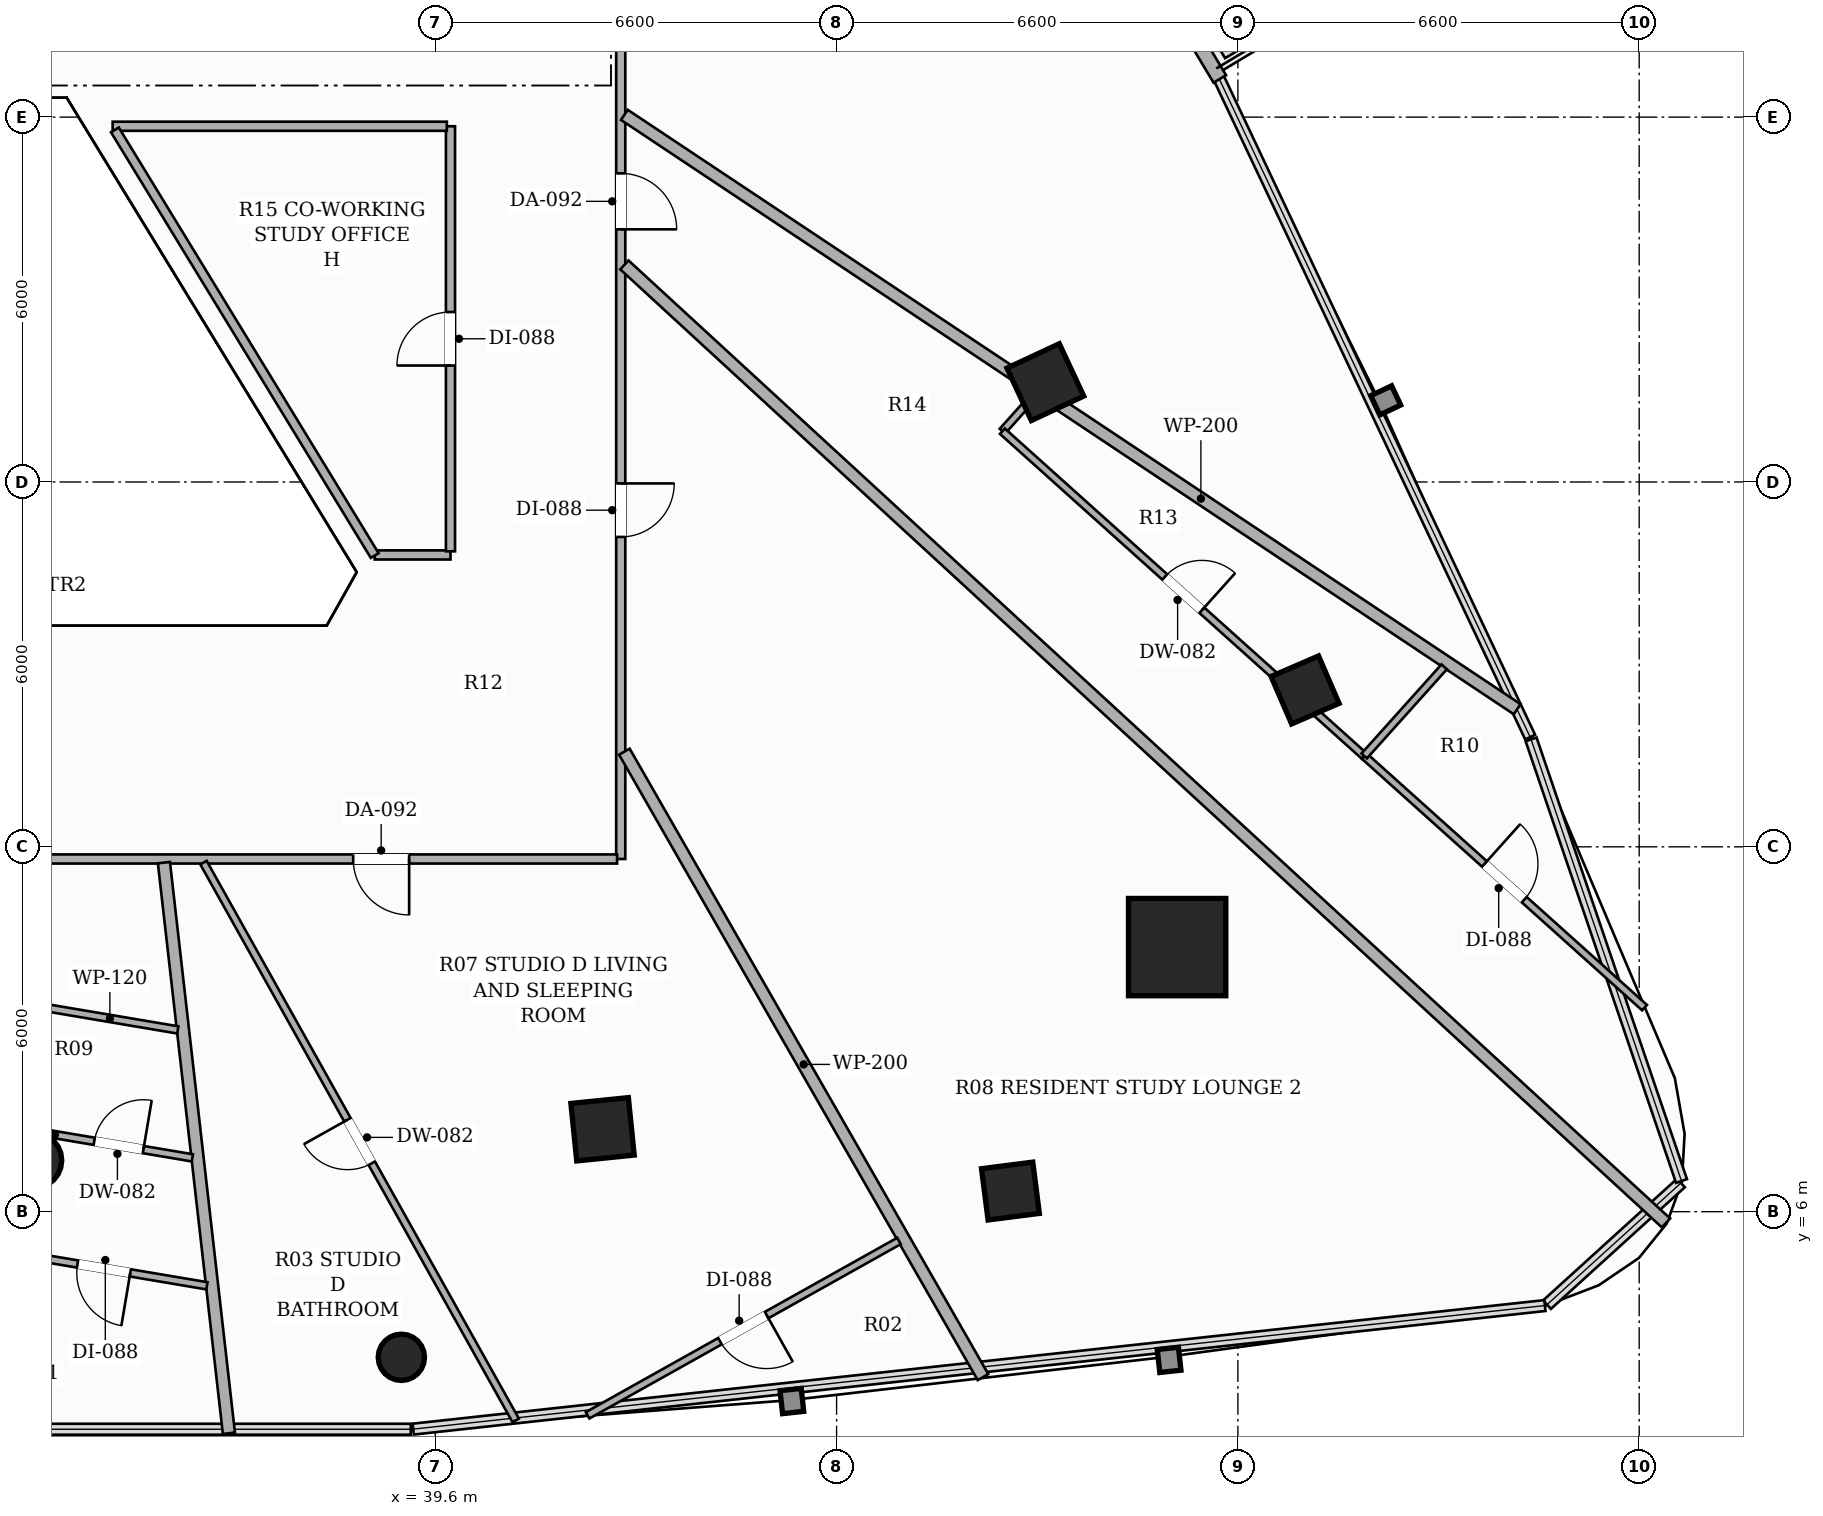
"""IFC4 building model, lengths in metres.
Left out: names, types, materials, properties, quantities, classifications, styles, units other than length and angle.
Written with IfcOpenShell. Run it as: python <this file> out.ifc"""

import sys

from ifc_helpers import new_model, si_unit, direction, frame, frame_2d, origin, origin_2d, place, context, subcontext, project, spatial, rectangle, hollow_rectangle, hollow_circle, extrude, element, fill, save


model = new_model("IFC4")
c1 = context("Model", 3, precision=1e-05, world=origin(), true_north=direction((0.0, 1.0)))
c2 = subcontext(c1, "Body", "Model", "MODEL_VIEW")
j1 = project(units=[si_unit("LENGTHUNIT", "METRE"), si_unit("PLANEANGLEUNIT", "RADIAN")], contexts=[c1])
p1 = place(None, origin())
s1 = spatial("IfcSite", under=j1, at=p1, CompositionType="ELEMENT")
p2 = place(p1, origin())
s2 = spatial("IfcBuilding", under=s1, at=p2, CompositionType="ELEMENT")
p3 = place(p2, frame((0.0, 0.0, 93.95)))
s3 = spatial("IfcBuildingStorey", under=s2, at=p3, CompositionType="ELEMENT", Elevation=93.95)
p4 = place(p3, frame((51.801, 10.351, 0.0), z_axis=(0.0, 0.0, 1.0), x_axis=(1.0, 0.0, 0.0)))
e1 = element("IfcColumn", 1, at=p4, inside=s3, PredefinedType="COLUMN", context=c2, shape_type="SweptSolid", body=[
    extrude(hollow_rectangle(XDim=1.6, YDim=1.6, WallThickness=0.05, at=origin_2d()), origin(), (0.0, 0.0, 1.0), 3.3),
])
p5 = place(p3, frame((33.0, 6.844, 0.0), z_axis=(0.0, 0.0, 1.0), x_axis=(1.0, 0.0, 0.0)))
e2 = element("IfcColumn", 2, at=p5, inside=s3, PredefinedType="COLUMN", context=c2, shape_type="SweptSolid", body=[
    extrude(hollow_circle(Radius=0.457, WallThickness=0.025, at=origin_2d()), origin(), (0.0, 0.0, 1.0), 3.3),
])
for number, where, z_axis, x_axis in (
    (3, (42.351, 7.355, 0.0), (0.0, 0.0, 1.0), (0.995, 0.101, 0.0)),
    (4, (49.633, 19.642, 0.0), (0.0, 0.0, 1.0), (-0.423, 0.906, 0.0)),
):
    element("IfcColumn", number, at=place(p3, frame(where, z_axis=z_axis, x_axis=x_axis)), inside=s3, PredefinedType="COLUMN", context=c2, shape_type="SweptSolid", body=[
        extrude(hollow_rectangle(XDim=0.95, YDim=0.95, WallThickness=0.032, at=origin_2d()), origin(), (0.0, 0.0, 1.0), 3.3),
    ])
for number, where, z_axis, x_axis in (
    (5, (49.059, 6.339, 0.0), (0.0, 0.0, 1.0), (0.992, 0.127, 0.0)),
    (6, (53.905, 14.58, 0.0), (0.0, 0.0, 1.0), (-0.397, 0.918, 0.0)),
):
    element("IfcColumn", number, at=place(p3, frame(where, z_axis=z_axis, x_axis=x_axis)), inside=s3, PredefinedType="COLUMN", context=c2, shape_type="SweptSolid", body=[
        extrude(hollow_rectangle(XDim=0.85, YDim=0.85, WallThickness=0.028, at=origin_2d()), origin(), (0.0, 0.0, 1.0), 3.3),
    ])
p6 = place(p3, frame((39.042, 3.605, 0.0), z_axis=(0.0, 0.0, 1.0), x_axis=(1.0, 0.0, 0.0)))
e7 = element("IfcColumn", 7, at=p6, inside=s3, PredefinedType="COLUMN", context=c2, shape_type="SweptSolid", body=[
    extrude(hollow_circle(Radius=0.381, WallThickness=0.022, at=origin_2d()), origin(), (0.0, 0.0, 1.0), 3.3),
])
p7 = place(p3, frame((52.503, 24.628, 0.0), z_axis=(0.0, 0.0, 1.0), x_axis=(-0.514369419392, 0.857568714678, 0.0)))
e8 = element("IfcWall", 8, at=p7, inside=s3, PredefinedType="SOLIDWALL", context=c2, shape_type="SweptSolid", body=[
    extrude(rectangle(XDim=12.22, YDim=0.24, at=frame_2d((6.11, 0.0))), origin(), (0.0, 0.0, 1.0), 2.584),
])
p8 = place(p7, frame((9.723, 0.0, 0.0)))
e9 = element("IfcOpeningElement", 9, at=p8, cuts=e8, PredefinedType="OPENING", context=c2, shape_type="SweptSolid", body=[
    extrude(rectangle(XDim=1.8, YDim=2.2, at=frame_2d((0.9, 1.1))), frame((0.0, 0.13, 0.0), z_axis=(0.0, -1.0, 0.0), x_axis=(1.0, 0.0, 0.0)), (0.0, 0.0, 1.0), 0.26),
])
p9 = place(p3, frame((42.65, 36.84, 0.0), z_axis=(0.0, 0.0, 1.0), x_axis=(0.0, -1.0, 0.0)))
e10 = element("IfcWall", 10, at=p9, inside=s3, PredefinedType="PARTITIONING", context=c2, shape_type="SweptSolid", body=[
    extrude(rectangle(XDim=25.04, YDim=0.15, at=frame_2d((12.52, 0.0))), origin(), (0.0, 0.0, 1.0), 2.373),
])
p10 = place(p9, frame((6.114, 0.0, 0.0)))
e11 = element("IfcOpeningElement", 11, at=p10, cuts=e10, PredefinedType="OPENING", context=c2, shape_type="SweptSolid", body=[
    extrude(rectangle(XDim=0.88, YDim=2.1, at=frame_2d((0.44, 1.05))), frame((0.0, 0.085, 0.0), z_axis=(0.0, -1.0, 0.0), x_axis=(1.0, 0.0, 0.0)), (0.0, 0.0, 1.0), 0.17),
])
p11 = place(p9, frame((18.864, 0.0, 0.0)))
e12 = element("IfcOpeningElement", 12, at=p11, cuts=e10, PredefinedType="OPENING", context=c2, shape_type="SweptSolid", body=[
    extrude(rectangle(XDim=0.88, YDim=2.1, at=frame_2d((0.44, 1.05))), frame((0.0, 0.085, 0.0), z_axis=(0.0, -1.0, 0.0), x_axis=(1.0, 0.0, 0.0)), (0.0, 0.0, 1.0), 0.17),
])
p12 = place(p9, frame((13.765, 0.0, 0.0)))
e13 = element("IfcOpeningElement", 13, at=p12, cuts=e10, PredefinedType="OPENING", context=c2, shape_type="SweptSolid", body=[
    extrude(rectangle(XDim=0.92, YDim=2.15, at=frame_2d((0.46, 1.075))), frame((0.0, 0.085, 0.0), z_axis=(0.0, -1.0, 0.0), x_axis=(1.0, 0.0, 0.0)), (0.0, 0.0, 1.0), 0.17),
])
p13 = place(p3, frame((42.59, 11.8, 0.0), z_axis=(0.0, 0.0, 1.0), x_axis=(-1.0, 0.0, 0.0)))
e14 = element("IfcWall", 14, at=p13, inside=s3, PredefinedType="PARTITIONING", context=c2, shape_type="SweptSolid", body=[
    extrude(rectangle(XDim=19.24, YDim=0.15, at=frame_2d((9.62, 0.0))), origin(), (0.0, 0.0, 1.0), 2.629),
])
p14 = place(p13, frame((11.192, 0.0, 0.0)))
e15 = element("IfcOpeningElement", 15, at=p14, cuts=e14, PredefinedType="OPENING", context=c2, shape_type="SweptSolid", body=[
    extrude(rectangle(XDim=0.92, YDim=2.15, at=frame_2d((0.46, 1.075))), frame((0.0, 0.085, 0.0), z_axis=(0.0, -1.0, 0.0), x_axis=(1.0, 0.0, 0.0)), (0.0, 0.0, 1.0), 0.17),
])
p15 = place(p13, frame((3.42, 0.0, 0.0)))
e16 = element("IfcOpeningElement", 16, at=p15, cuts=e14, PredefinedType="OPENING", context=c2, shape_type="SweptSolid", body=[
    extrude(rectangle(XDim=0.92, YDim=2.15, at=frame_2d((0.46, 1.075))), frame((0.0, 0.085, 0.0), z_axis=(0.0, -1.0, 0.0), x_axis=(1.0, 0.0, 0.0)), (0.0, 0.0, 1.0), 0.17),
])
p16 = place(p3, frame((38.604, 16.8, 0.0), z_axis=(0.0, 0.0, 1.0), x_axis=(1.0, 0.0, 0.0)))
e17 = element("IfcWall", 17, at=p16, inside=s3, PredefinedType="PARTITIONING", context=c2, shape_type="SweptSolid", body=[
    extrude(rectangle(XDim=1.246, YDim=0.15, at=frame_2d((0.623, 0.0))), origin(), (0.0, 0.0, 1.0), 3.02),
])
p17 = place(p3, frame((39.85, 16.86, 0.0), z_axis=(0.0, 0.0, 1.0), x_axis=(0.0, 1.0, 0.0)))
e18 = element("IfcWall", 18, at=p17, inside=s3, PredefinedType="PARTITIONING", context=c2, shape_type="SweptSolid", body=[
    extrude(rectangle(XDim=6.99, YDim=0.15, at=frame_2d((3.495, 0.0))), origin(), (0.0, 0.0, 1.0), 2.629),
])
p18 = place(p17, frame((3.055, 0.0, 0.0)))
e19 = element("IfcOpeningElement", 19, at=p18, cuts=e18, PredefinedType="OPENING", context=c2, shape_type="SweptSolid", body=[
    extrude(rectangle(XDim=0.88, YDim=2.1, at=frame_2d((0.44, 1.05))), frame((0.0, 0.085, 0.0), z_axis=(0.0, -1.0, 0.0), x_axis=(1.0, 0.0, 0.0)), (0.0, 0.0, 1.0), 0.17),
])
p19 = place(p3, frame((39.79, 23.85, 0.0), z_axis=(0.0, 0.0, 1.0), x_axis=(-1.0, 0.0, 0.0)))
e20 = element("IfcWall", 20, at=p19, inside=s3, PredefinedType="PARTITIONING", context=c2, shape_type="SweptSolid", body=[
    extrude(rectangle(XDim=5.496, YDim=0.15, at=frame_2d((2.748, 0.0))), origin(), (0.0, 0.0, 1.0), 2.629),
])
p20 = place(p3, frame((34.331, 23.79, 0.0), z_axis=(0.0, 0.0, 1.0), x_axis=(0.52102126657, -0.853543695297, 0.0)))
e21 = element("IfcWall", 21, at=p20, inside=s3, PredefinedType="PARTITIONING", context=c2, shape_type="SweptSolid", body=[
    extrude(rectangle(XDim=8.201, YDim=0.15, at=frame_2d((4.101, 0.0))), origin(), (0.0, 0.0, 1.0), 2.629),
])
p21 = place(p3, frame((57.393, 14.263, 0.0), z_axis=(0.0, 0.0, 1.0), x_axis=(-0.83243126042, 0.554128321488, 0.0)))
e22 = element("IfcWall", 22, at=p21, inside=s3, PredefinedType="PARTITIONING", context=c2, shape_type="SweptSolid", body=[
    extrude(rectangle(XDim=17.639, YDim=0.2, at=frame_2d((8.819, 0.0))), origin(), (0.0, 0.0, 1.0), 2.373),
])
p22 = place(p3, frame((48.608, 3.279, 0.0), z_axis=(0.0, 0.0, 1.0), x_axis=(-0.497428948928, 0.867504720891, 0.0)))
e23 = element("IfcWall", 23, at=p22, inside=s3, PredefinedType="PARTITIONING", context=c2, shape_type="SweptSolid", body=[
    extrude(rectangle(XDim=11.857, YDim=0.2, at=frame_2d((5.928, 0.0))), origin(), (0.0, 0.0, 1.0), 2.373),
])
p23 = place(p3, frame((42.71, 21.57, 0.0), z_axis=(0.0, 0.0, 1.0), x_axis=(0.736048495707, -0.67692880864, 0.0)))
e24 = element("IfcWall", 24, at=p23, inside=s3, PredefinedType="PARTITIONING", context=c2, shape_type="SweptSolid", body=[
    extrude(rectangle(XDim=23.274, YDim=0.2, at=frame_2d((11.637, 0.0))), origin(), (0.0, 0.0, 1.0), 2.373),
])
p24 = place(p3, frame((35.137, 11.74, 0.0), z_axis=(0.0, 0.0, 1.0), x_axis=(0.113194461651, -0.993572852815, 0.0)))
e25 = element("IfcWall", 25, at=p24, inside=s3, PredefinedType="PARTITIONING", context=c2, shape_type="SweptSolid", body=[
    extrude(rectangle(XDim=9.445, YDim=0.2, at=frame_2d((4.722, 0.0))), origin(), (0.0, 0.0, 1.0), 2.373),
])
p25 = place(p3, frame((35.365, 8.989, 0.0), z_axis=(0.0, 0.0, 1.0), x_axis=(-0.986047933852, 0.166461623646, 0.0)))
e26 = element("IfcWall", 26, at=p25, inside=s3, PredefinedType="PARTITIONING", context=c2, shape_type="SweptSolid", body=[
    extrude(rectangle(XDim=2.264, YDim=0.12, at=frame_2d((1.132, 0.0))), origin(), (0.0, 0.0, 1.0), 2.629),
])
p26 = place(p3, frame((32.794, 7.359, 0.0), z_axis=(0.0, 0.0, 1.0), x_axis=(0.986086685245, -0.166231913849, 0.0)))
e27 = element("IfcWall", 27, at=p26, inside=s3, PredefinedType="PARTITIONING", context=c2, shape_type="SweptSolid", body=[
    extrude(rectangle(XDim=2.851, YDim=0.12, at=frame_2d((1.425, 0.0))), origin(), (0.0, 0.0, 1.0), 2.629),
])
p27 = place(p26, frame((1.214, 0.0, 0.0)))
e28 = element("IfcOpeningElement", 28, at=p27, cuts=e27, PredefinedType="OPENING", context=c2, shape_type="SweptSolid", body=[
    extrude(rectangle(XDim=0.82, YDim=2.1, at=frame_2d((0.41, 1.05))), frame((0.0, 0.07, 0.0), z_axis=(0.0, -1.0, 0.0), x_axis=(1.0, 0.0, 0.0)), (0.0, 0.0, 1.0), 0.14),
])
p28 = place(p3, frame((35.844, 4.781, 0.0), z_axis=(0.0, 0.0, 1.0), x_axis=(-0.986098591399, 0.166161271182, 0.0)))
e29 = element("IfcWall", 29, at=p28, inside=s3, PredefinedType="PARTITIONING", context=c2, shape_type="SweptSolid", body=[
    extrude(rectangle(XDim=3.437, YDim=0.12, at=frame_2d((1.718, 0.0))), origin(), (0.0, 0.0, 1.0), 3.02),
])
p29 = place(p28, frame((1.278, 0.0, 0.0)))
e30 = element("IfcOpeningElement", 30, at=p29, cuts=e29, PredefinedType="OPENING", context=c2, shape_type="SweptSolid", body=[
    extrude(rectangle(XDim=0.88, YDim=2.1, at=frame_2d((0.44, 1.05))), frame((0.0, 0.07, 0.0), z_axis=(0.0, -1.0, 0.0), x_axis=(1.0, 0.0, 0.0)), (0.0, 0.0, 1.0), 0.14),
])
p30 = place(p3, frame((40.923, 2.567, 0.0), z_axis=(0.0, 0.0, 1.0), x_axis=(-0.4884640488, 0.872584020613, 0.0)))
e31 = element("IfcWall", 31, at=p30, inside=s3, PredefinedType="PARTITIONING", context=c2, shape_type="SweptSolid", body=[
    extrude(rectangle(XDim=10.512, YDim=0.12, at=frame_2d((5.256, 0.0))), origin(), (0.0, 0.0, 1.0), 2.373),
])
p31 = place(p30, frame((4.846, 0.0, 0.0)))
e32 = element("IfcOpeningElement", 32, at=p31, cuts=e31, PredefinedType="OPENING", context=c2, shape_type="SweptSolid", body=[
    extrude(rectangle(XDim=0.82, YDim=2.1, at=frame_2d((0.41, 1.05))), frame((0.0, 0.07, 0.0), z_axis=(0.0, -1.0, 0.0), x_axis=(1.0, 0.0, 0.0)), (0.0, 0.0, 1.0), 0.14),
])
p32 = place(p3, frame((47.226, 5.518, 0.0), z_axis=(0.0, 0.0, 1.0), x_axis=(-0.872551409816, -0.488522299622, 0.0)))
e33 = element("IfcWall", 33, at=p32, inside=s3, PredefinedType="PARTITIONING", context=c2, shape_type="SweptSolid", body=[
    extrude(rectangle(XDim=5.869, YDim=0.12, at=frame_2d((2.935, 0.0))), origin(), (0.0, 0.0, 1.0), 3.02),
])
p33 = place(p32, frame((2.494, 0.0, 0.0)))
e34 = element("IfcOpeningElement", 34, at=p33, cuts=e33, PredefinedType="OPENING", context=c2, shape_type="SweptSolid", body=[
    extrude(rectangle(XDim=0.88, YDim=2.1, at=frame_2d((0.44, 1.05))), frame((0.0, 0.07, 0.0), z_axis=(0.0, -1.0, 0.0), x_axis=(1.0, 0.0, 0.0)), (0.0, 0.0, 1.0), 0.14),
])
p34 = place(p3, frame((49.467, 19.437, 0.0), z_axis=(0.0, 0.0, 1.0), x_axis=(-0.667729657393, -0.744403858559, 0.0)))
e35 = element("IfcWall", 35, at=p34, inside=s3, PredefinedType="PARTITIONING", context=c2, shape_type="SweptSolid", body=[
    extrude(rectangle(XDim=0.809, YDim=0.12, at=frame_2d((0.404, 0.0))), origin(), (0.0, 0.0, 1.0), 2.373),
])
p35 = place(p3, frame((48.927, 18.835, 0.0), z_axis=(0.0, 0.0, 1.0), x_axis=(0.744157434795, -0.668004275615, 0.0)))
e36 = element("IfcWall", 36, at=p35, inside=s3, PredefinedType="PARTITIONING", context=c2, shape_type="SweptSolid", body=[
    extrude(rectangle(XDim=7.996, YDim=0.12, at=frame_2d((3.998, 0.0))), origin(), (0.0, 0.0, 1.0), 2.373),
])
p36 = place(p35, frame((3.588, 0.0, 0.0)))
e37 = element("IfcOpeningElement", 37, at=p36, cuts=e36, PredefinedType="OPENING", context=c2, shape_type="SweptSolid", body=[
    extrude(rectangle(XDim=0.82, YDim=2.1, at=frame_2d((0.41, 1.05))), frame((0.0, 0.07, 0.0), z_axis=(0.0, -1.0, 0.0), x_axis=(1.0, 0.0, 0.0)), (0.0, 0.0, 1.0), 0.14),
])
p37 = place(p3, frame((54.877, 13.494, 0.0), z_axis=(0.0, 0.0, 1.0), x_axis=(0.744181011259, -0.667978010477, 0.0)))
e38 = element("IfcWall", 38, at=p37, inside=s3, PredefinedType="PARTITIONING", context=c2, shape_type="SweptSolid", body=[
    extrude(rectangle(XDim=6.196, YDim=0.12, at=frame_2d((3.098, 0.0))), origin(), (0.0, 0.0, 1.0), 2.579),
])
p38 = place(p37, frame((2.658, 0.0, 0.0)))
e39 = element("IfcOpeningElement", 39, at=p38, cuts=e38, PredefinedType="OPENING", context=c2, shape_type="SweptSolid", body=[
    extrude(rectangle(XDim=0.88, YDim=2.1, at=frame_2d((0.44, 1.05))), frame((0.0, 0.07, 0.0), z_axis=(0.0, -1.0, 0.0), x_axis=(1.0, 0.0, 0.0)), (0.0, 0.0, 1.0), 0.14),
])
p39 = place(p3, frame((56.193, 14.96, 0.0), z_axis=(0.0, 0.0, 1.0), x_axis=(-0.668039966909, -0.744125394414, 0.0)))
e40 = element("IfcWall", 40, at=p39, inside=s3, PredefinedType="PARTITIONING", context=c2, shape_type="SweptSolid", body=[
    extrude(rectangle(XDim=1.97, YDim=0.12, at=frame_2d((0.985, 0.0))), origin(), (0.0, 0.0, 1.0), 2.579),
])
p40 = place(p11, origin())
e41 = element("IfcDoor", 41, at=p40, inside=s3, OperationType="SINGLE_SWING_LEFT", PredefinedType="DOOR", context=c2, shape_type="SweptSolid", body=[
    extrude(rectangle(XDim=0.88, YDim=2.1, at=frame_2d((0.44, 1.05))), frame((0.0, 0.025, 0.0), z_axis=(0.0, -1.0, 0.0), x_axis=(1.0, 0.0, 0.0)), (0.0, 0.0, 1.0), 0.05),
])
fill(e12, e41)
p41 = place(p27, origin())
e42 = element("IfcDoor", 42, at=p41, inside=s3, OperationType="SINGLE_SWING_RIGHT", PredefinedType="DOOR", context=c2, shape_type="SweptSolid", body=[
    extrude(rectangle(XDim=0.82, YDim=2.1, at=frame_2d((0.41, 1.05))), frame((0.0, 0.025, 0.0), z_axis=(0.0, -1.0, 0.0), x_axis=(1.0, 0.0, 0.0)), (0.0, 0.0, 1.0), 0.05),
])
fill(e28, e42)
p42 = place(p29, origin())
e43 = element("IfcDoor", 43, at=p42, inside=s3, OperationType="SINGLE_SWING_LEFT", PredefinedType="DOOR", context=c2, shape_type="SweptSolid", body=[
    extrude(rectangle(XDim=0.88, YDim=2.1, at=frame_2d((0.44, 1.05))), frame((0.0, 0.025, 0.0), z_axis=(0.0, -1.0, 0.0), x_axis=(1.0, 0.0, 0.0)), (0.0, 0.0, 1.0), 0.05),
])
fill(e30, e43)
p43 = place(p15, origin())
e44 = element("IfcDoor", 44, at=p43, inside=s3, OperationType="SINGLE_SWING_LEFT", PredefinedType="DOOR", context=c2, shape_type="SweptSolid", body=[
    extrude(rectangle(XDim=0.92, YDim=2.15, at=frame_2d((0.46, 1.075))), frame((0.0, 0.025, 0.0), z_axis=(0.0, -1.0, 0.0), x_axis=(1.0, 0.0, 0.0)), (0.0, 0.0, 1.0), 0.05),
])
fill(e16, e44)
p44 = place(p31, origin())
e45 = element("IfcDoor", 45, at=p44, inside=s3, OperationType="SINGLE_SWING_RIGHT", PredefinedType="DOOR", context=c2, shape_type="SweptSolid", body=[
    extrude(rectangle(XDim=0.82, YDim=2.1, at=frame_2d((0.41, 1.05))), frame((0.0, 0.025, 0.0), z_axis=(0.0, -1.0, 0.0), x_axis=(1.0, 0.0, 0.0)), (0.0, 0.0, 1.0), 0.05),
])
fill(e32, e45)
p45 = place(p33, origin())
e46 = element("IfcDoor", 46, at=p45, inside=s3, OperationType="SINGLE_SWING_LEFT", PredefinedType="DOOR", context=c2, shape_type="SweptSolid", body=[
    extrude(rectangle(XDim=0.88, YDim=2.1, at=frame_2d((0.44, 1.05))), frame((0.0, 0.025, 0.0), z_axis=(0.0, -1.0, 0.0), x_axis=(1.0, 0.0, 0.0)), (0.0, 0.0, 1.0), 0.05),
])
fill(e34, e46)
p46 = place(p12, origin())
e47 = element("IfcDoor", 47, at=p46, inside=s3, OperationType="SINGLE_SWING_RIGHT", PredefinedType="DOOR", context=c2, shape_type="SweptSolid", body=[
    extrude(rectangle(XDim=0.92, YDim=2.15, at=frame_2d((0.46, 1.075))), frame((0.0, 0.025, 0.0), z_axis=(0.0, -1.0, 0.0), x_axis=(1.0, 0.0, 0.0)), (0.0, 0.0, 1.0), 0.05),
])
fill(e13, e47)
p47 = place(p36, origin())
e48 = element("IfcDoor", 48, at=p47, inside=s3, OperationType="SINGLE_SWING_RIGHT", PredefinedType="DOOR", context=c2, shape_type="SweptSolid", body=[
    extrude(rectangle(XDim=0.82, YDim=2.1, at=frame_2d((0.41, 1.05))), frame((0.0, 0.025, 0.0), z_axis=(0.0, -1.0, 0.0), x_axis=(1.0, 0.0, 0.0)), (0.0, 0.0, 1.0), 0.05),
])
fill(e37, e48)
p48 = place(p38, origin())
e49 = element("IfcDoor", 49, at=p48, inside=s3, OperationType="SINGLE_SWING_LEFT", PredefinedType="DOOR", context=c2, shape_type="SweptSolid", body=[
    extrude(rectangle(XDim=0.88, YDim=2.1, at=frame_2d((0.44, 1.05))), frame((0.0, 0.025, 0.0), z_axis=(0.0, -1.0, 0.0), x_axis=(1.0, 0.0, 0.0)), (0.0, 0.0, 1.0), 0.05),
])
fill(e39, e49)
p49 = place(p18, origin())
e50 = element("IfcDoor", 50, at=p49, inside=s3, OperationType="SINGLE_SWING_LEFT", PredefinedType="DOOR", context=c2, shape_type="SweptSolid", body=[
    extrude(rectangle(XDim=0.88, YDim=2.1, at=frame_2d((0.44, 1.05))), frame((0.0, 0.025, 0.0), z_axis=(0.0, -1.0, 0.0), x_axis=(1.0, 0.0, 0.0)), (0.0, 0.0, 1.0), 0.05),
])
fill(e19, e50)
save(model, sys.argv[1])
